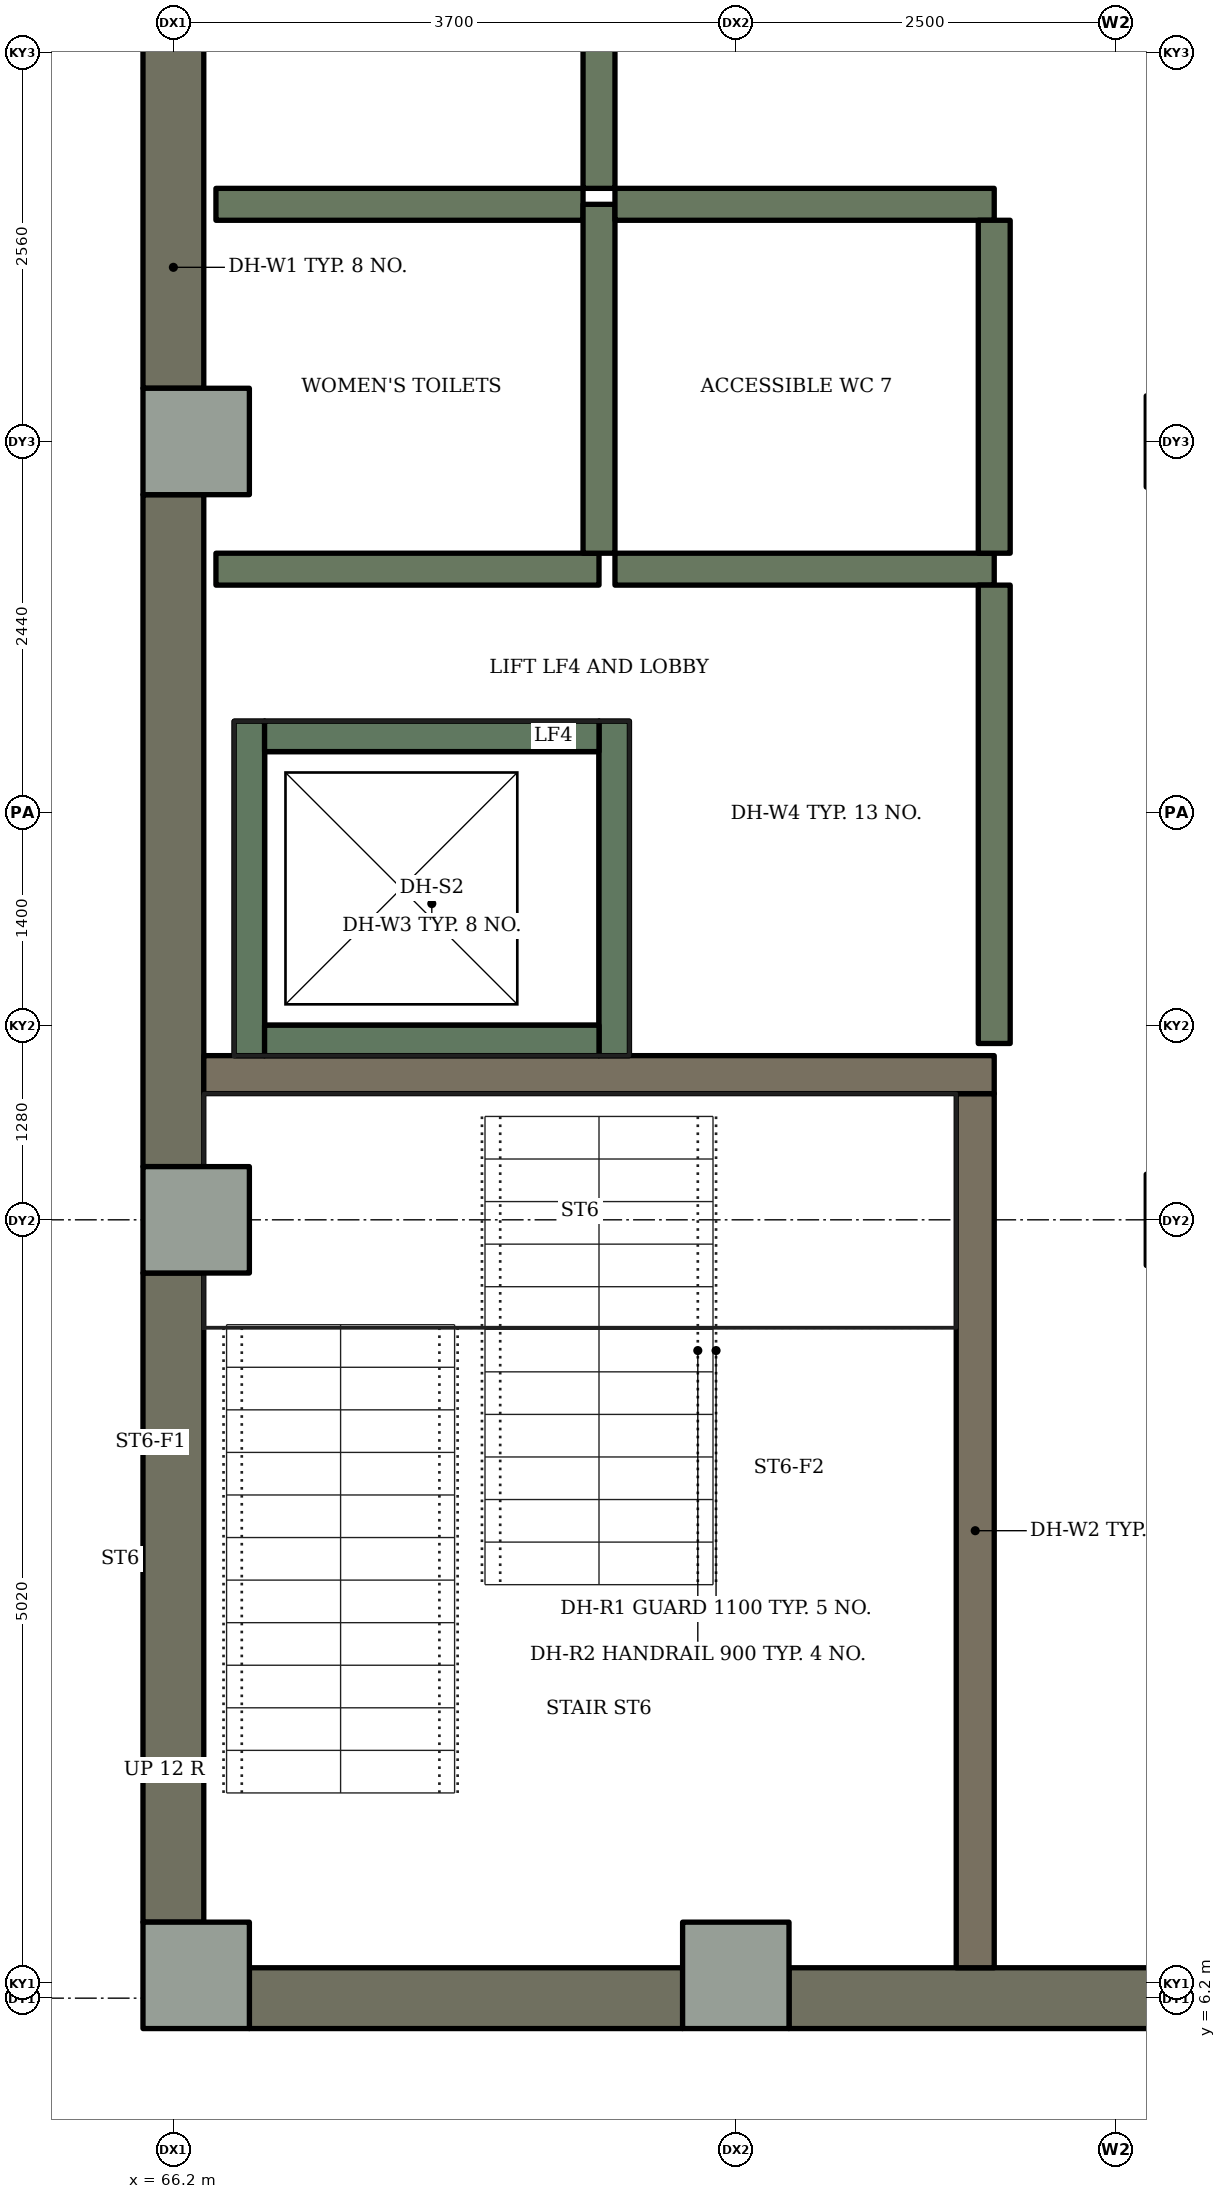
"""IFC4 building model, lengths in metres.
Left out: names, types, materials, properties, quantities, classifications, styles, units other than length and angle.
Written with IfcOpenShell. Run it as: python <this file> out.ifc"""

import sys

from ifc_helpers import new_model, si_unit, direction, frame, frame_2d, origin, origin_2d, place, context, subcontext, project, spatial, rectangle, extrude, element, fill, save


model = new_model("IFC4")
c1 = context("Model", 3, precision=1e-05, world=origin(), true_north=direction((0.0, 1.0)))
c2 = subcontext(c1, "Body", "Model", "MODEL_VIEW")
j1 = project(units=[si_unit("LENGTHUNIT", "METRE"), si_unit("PLANEANGLEUNIT", "RADIAN")], contexts=[c1])
p1 = place(None, origin())
s1 = spatial("IfcSite", under=j1, at=p1, CompositionType="ELEMENT")
p2 = place(p1, origin())
s2 = spatial("IfcBuilding", under=s1, at=p2, CompositionType="ELEMENT")
p3 = place(p2, origin())
s3 = spatial("IfcBuildingStorey", under=s2, at=p3, CompositionType="ELEMENT", Elevation=0.0)
for number, where, z_axis, x_axis in (
    (1, (66.35, 6.35, 0.0), (0.0, 0.0, 1.0), (1.0, 0.0, 0.0)),
    (2, (69.9, 6.35, 0.0), (0.0, 0.0, 1.0), (1.0, 0.0, 0.0)),
    (3, (66.35, 11.32, 0.0), (0.0, 0.0, 1.0), (1.0, 0.0, 0.0)),
    (4, (66.35, 16.44, 0.0), (0.0, 0.0, 1.0), (1.0, 0.0, 0.0)),
):
    element("IfcColumn", number, at=place(p3, frame(where, z_axis=z_axis, x_axis=x_axis)), inside=s3, PredefinedType="COLUMN", context=c2, shape_type="SweptSolid", body=[
        extrude(rectangle(XDim=0.7, YDim=0.7, at=origin_2d()), origin(), (0.0, 0.0, 1.0), 4.2),
    ])
p4 = place(p3, frame((69.55, 6.2, 0.0), z_axis=(0.0, 0.0, 1.0), x_axis=(-1.0, 0.0, 0.0)))
e5 = element("IfcWall", 5, at=p4, inside=s3, PredefinedType="SOLIDWALL", context=c2, shape_type="SweptSolid", body=[
    extrude(rectangle(XDim=2.85, YDim=0.4, at=frame_2d((1.425, 0.0))), origin(), (0.0, 0.0, 1.0), 4.2),
])
p5 = place(p4, frame((1.55, 0.0, 0.0)))
e6 = element("IfcOpeningElement", 6, at=p5, cuts=e5, PredefinedType="OPENING", context=c2, shape_type="SweptSolid", body=[
    extrude(rectangle(XDim=1.0, YDim=2.4, at=frame_2d((0.5, 1.2))), frame((0.0, 0.21, 0.0), z_axis=(0.0, -1.0, 0.0), x_axis=(1.0, 0.0, 0.0)), (0.0, 0.0, 1.0), 0.42),
])
p6 = place(p3, frame((73.25, 6.2, 0.0), z_axis=(0.0, 0.0, 1.0), x_axis=(-1.0, 0.0, 0.0)))
e7 = element("IfcWall", 7, at=p6, inside=s3, PredefinedType="SOLIDWALL", context=c2, shape_type="SweptSolid", body=[
    extrude(rectangle(XDim=3.0, YDim=0.4, at=frame_2d((1.5, 0.0))), origin(), (0.0, 0.0, 1.0), 4.2),
])
p7 = place(p3, frame((66.2, 6.7, 0.0), z_axis=(0.0, 0.0, 1.0), x_axis=(0.0, 1.0, 0.0)))
e8 = element("IfcWall", 8, at=p7, inside=s3, PredefinedType="SOLIDWALL", context=c2, shape_type="SweptSolid", body=[
    extrude(rectangle(XDim=4.27, YDim=0.4, at=frame_2d((2.135, 0.0))), origin(), (0.0, 0.0, 1.0), 4.2),
])
p8 = place(p7, frame((1.685, 0.0, 0.9)))
e9 = element("IfcOpeningElement", 9, at=p8, cuts=e8, PredefinedType="OPENING", context=c2, shape_type="SweptSolid", body=[
    extrude(rectangle(XDim=0.9, YDim=1.8, at=frame_2d((0.45, 0.9))), frame((0.0, 0.21, 0.0), z_axis=(0.0, -1.0, 0.0), x_axis=(1.0, 0.0, 0.0)), (0.0, 0.0, 1.0), 0.42),
])
p9 = place(p3, frame((66.2, 11.67, 0.0), z_axis=(0.0, 0.0, 1.0), x_axis=(0.0, 1.0, 0.0)))
e10 = element("IfcWall", 10, at=p9, inside=s3, PredefinedType="SOLIDWALL", context=c2, shape_type="SweptSolid", body=[
    extrude(rectangle(XDim=4.42, YDim=0.4, at=frame_2d((2.21, 0.0))), origin(), (0.0, 0.0, 1.0), 4.2),
])
p10 = place(p9, frame((0.73, 0.0, 1.5)))
e11 = element("IfcOpeningElement", 11, at=p10, cuts=e10, PredefinedType="OPENING", context=c2, shape_type="SweptSolid", body=[
    extrude(rectangle(XDim=0.6, YDim=1.2, at=frame_2d((0.3, 0.6))), frame((0.0, 0.21, 0.0), z_axis=(0.0, -1.0, 0.0), x_axis=(1.0, 0.0, 0.0)), (0.0, 0.0, 1.0), 0.42),
])
p11 = place(p9, frame((3.43, 0.0, 1.5)))
e12 = element("IfcOpeningElement", 12, at=p11, cuts=e10, PredefinedType="OPENING", context=c2, shape_type="SweptSolid", body=[
    extrude(rectangle(XDim=0.6, YDim=1.2, at=frame_2d((0.3, 0.6))), frame((0.0, 0.21, 0.0), z_axis=(0.0, -1.0, 0.0), x_axis=(1.0, 0.0, 0.0)), (0.0, 0.0, 1.0), 0.42),
])
p12 = place(p3, frame((66.2, 16.79, 0.0), z_axis=(0.0, 0.0, 1.0), x_axis=(0.0, 1.0, 0.0)))
e13 = element("IfcWall", 13, at=p12, inside=s3, PredefinedType="SOLIDWALL", context=c2, shape_type="SweptSolid", body=[
    extrude(rectangle(XDim=4.42, YDim=0.4, at=frame_2d((2.21, 0.0))), origin(), (0.0, 0.0, 1.0), 4.2),
])
p13 = place(p12, frame((1.71, 0.0, 0.9)))
e14 = element("IfcOpeningElement", 14, at=p13, cuts=e13, PredefinedType="OPENING", context=c2, shape_type="SweptSolid", body=[
    extrude(rectangle(XDim=1.0, YDim=2.4, at=frame_2d((0.5, 1.2))), frame((0.0, 0.21, 0.0), z_axis=(0.0, -1.0, 0.0), x_axis=(1.0, 0.0, 0.0)), (0.0, 0.0, 1.0), 0.42),
])
p14 = place(p3, frame((71.475, 6.4, 0.0), z_axis=(0.0, 0.0, 1.0), x_axis=(0.0, 1.0, 0.0)))
e15 = element("IfcWall", 15, at=p14, inside=s3, PredefinedType="SHEAR", context=c2, shape_type="SweptSolid", body=[
    extrude(rectangle(XDim=5.75, YDim=0.25, at=frame_2d((2.875, 0.0))), origin(), (0.0, 0.0, 1.0), 4.2),
])
p15 = place(p14, frame((0.85, 0.0, 0.0)))
e16 = element("IfcOpeningElement", 16, at=p15, cuts=e15, PredefinedType="OPENING", context=c2, shape_type="SweptSolid", body=[
    extrude(rectangle(XDim=1.0, YDim=2.1, at=frame_2d((0.5, 1.05))), frame((0.0, 0.135, 0.0), z_axis=(0.0, -1.0, 0.0), x_axis=(1.0, 0.0, 0.0)), (0.0, 0.0, 1.0), 0.27),
])
p16 = place(p3, frame((66.4, 12.275, 0.0), z_axis=(0.0, 0.0, 1.0), x_axis=(1.0, 0.0, 0.0)))
e17 = element("IfcWall", 17, at=p16, inside=s3, PredefinedType="SHEAR", context=c2, shape_type="SweptSolid", body=[
    extrude(rectangle(XDim=5.2, YDim=0.25, at=frame_2d((2.6, 0.0))), origin(), (0.0, 0.0, 1.0), 4.2),
])
p17 = place(p3, frame((66.7, 12.4, 0.0), z_axis=(0.0, 0.0, 1.0), x_axis=(0.0, 1.0, 0.0)))
e18 = element("IfcWall", 18, at=p17, inside=s3, PredefinedType="SHEAR", context=c2, shape_type="SweptSolid", body=[
    extrude(rectangle(XDim=2.2, YDim=0.2, at=frame_2d((1.1, 0.0))), origin(), (0.0, 0.0, 1.0), 4.2),
])
p18 = place(p3, frame((69.1, 12.4, 0.0), z_axis=(0.0, 0.0, 1.0), x_axis=(0.0, 1.0, 0.0)))
e19 = element("IfcWall", 19, at=p18, inside=s3, PredefinedType="SHEAR", context=c2, shape_type="SweptSolid", body=[
    extrude(rectangle(XDim=2.2, YDim=0.2, at=frame_2d((1.1, 0.0))), origin(), (0.0, 0.0, 1.0), 4.2),
])
p19 = place(p18, frame((0.55, 0.0, 0.0)))
e20 = element("IfcOpeningElement", 20, at=p19, cuts=e19, PredefinedType="OPENING", context=c2, shape_type="SweptSolid", body=[
    extrude(rectangle(XDim=1.1, YDim=2.1, at=frame_2d((0.55, 1.05))), frame((0.0, 0.11, 0.0), z_axis=(0.0, -1.0, 0.0), x_axis=(1.0, 0.0, 0.0)), (0.0, 0.0, 1.0), 0.22),
])
for number, where, z_axis, x_axis in (
    (21, (66.8, 12.5, 0.0), (0.0, 0.0, 1.0), (1.0, 0.0, 0.0)),
    (22, (66.8, 14.5, 0.0), (0.0, 0.0, 1.0), (1.0, 0.0, 0.0)),
):
    element("IfcWall", number, at=place(p3, frame(where, z_axis=z_axis, x_axis=x_axis)), inside=s3, PredefinedType="SHEAR", context=c2, shape_type="SweptSolid", body=[
        extrude(rectangle(XDim=2.2, YDim=0.2, at=frame_2d((1.1, 0.0))), origin(), (0.0, 0.0, 1.0), 4.2),
    ])
for number, where, z_axis, x_axis in (
    (23, (66.7, 12.4, -1.4), (0.0, 0.0, 1.0), (0.0, 1.0, 0.0)),
    (24, (69.1, 12.4, -1.4), (0.0, 0.0, 1.0), (0.0, 1.0, 0.0)),
):
    element("IfcWall", number, at=place(p3, frame(where, z_axis=z_axis, x_axis=x_axis)), inside=s3, PredefinedType="SHEAR", context=c2, shape_type="SweptSolid", body=[
        extrude(rectangle(XDim=2.2, YDim=0.2, at=frame_2d((1.1, 0.0))), origin(), (0.0, 0.0, 1.0), 1.4),
    ])
for number, where, z_axis, x_axis in (
    (25, (66.8, 12.5, -1.4), (0.0, 0.0, 1.0), (1.0, 0.0, 0.0)),
    (26, (66.8, 14.5, -1.4), (0.0, 0.0, 1.0), (1.0, 0.0, 0.0)),
):
    element("IfcWall", number, at=place(p3, frame(where, z_axis=z_axis, x_axis=x_axis)), inside=s3, PredefinedType="SHEAR", context=c2, shape_type="SweptSolid", body=[
        extrude(rectangle(XDim=2.2, YDim=0.2, at=frame_2d((1.1, 0.0))), origin(), (0.0, 0.0, 1.0), 1.4),
    ])
for number, where, z_axis, x_axis in (
    (27, (72.9, 11.32, 0.0), (0.0, 0.0, 1.0), (1.0, 0.0, 0.0)),
    (28, (72.9, 16.44, 0.0), (0.0, 0.0, 1.0), (1.0, 0.0, 0.0)),
):
    element("IfcColumn", number, at=place(p3, frame(where, z_axis=z_axis, x_axis=x_axis)), inside=s3, PredefinedType="COLUMN", context=c2, shape_type="SweptSolid", body=[
        extrude(rectangle(XDim=0.6, YDim=0.6, at=origin_2d()), origin(), (0.0, 0.0, 1.0), 4.2),
    ])
for number, where, z_axis, x_axis in (
    (29, (66.4, 11.59, 0.0), (0.0, 0.0, 1.0), (0.0, -1.0, 0.0)),
    (30, (66.4, 16.71, 0.0), (0.0, 0.0, 1.0), (0.0, -1.0, 0.0)),
):
    element("IfcWall", number, at=place(p3, frame(where, z_axis=z_axis, x_axis=x_axis)), inside=s3, PredefinedType="PARTITIONING", context=c2, shape_type="SweptSolid", body=[
        extrude(rectangle(XDim=0.54, YDim=0.21, at=frame_2d((0.27, 0.0))), origin(), (0.0, 0.0, 1.0), 3.98),
    ])
p20 = place(p3, frame((66.48, 15.6, 0.0), z_axis=(0.0, 0.0, 1.0), x_axis=(1.0, 0.0, 0.0)))
e31 = element("IfcWall", 31, at=p20, inside=s3, PredefinedType="PARTITIONING", context=c2, shape_type="SweptSolid", body=[
    extrude(rectangle(XDim=2.52, YDim=0.21, at=frame_2d((1.26, 0.0))), origin(), (0.0, 0.0, 1.0), 3.98),
])
p21 = place(p20, frame((0.77, 0.0, 0.0)))
e32 = element("IfcOpeningElement", 32, at=p21, cuts=e31, PredefinedType="OPENING", context=c2, shape_type="SweptSolid", body=[
    extrude(rectangle(XDim=1.0, YDim=2.1, at=frame_2d((0.5, 1.05))), frame((0.0, 0.115, 0.0), z_axis=(0.0, -1.0, 0.0), x_axis=(1.0, 0.0, 0.0)), (0.0, 0.0, 1.0), 0.23),
])
p22 = place(p3, frame((68.895, 18.0, 0.0), z_axis=(0.0, 0.0, 1.0), x_axis=(-1.0, 0.0, 0.0)))
e33 = element("IfcWall", 33, at=p22, inside=s3, PredefinedType="PARTITIONING", context=c2, shape_type="SweptSolid", body=[
    extrude(rectangle(XDim=2.415, YDim=0.21, at=frame_2d((1.208, 0.0))), origin(), (0.0, 0.0, 1.0), 3.98),
])
for number, where, z_axis, x_axis in (
    (34, (69.0, 15.705, 0.0), (0.0, 0.0, 1.0), (0.0, 1.0, 0.0)),
    (35, (69.0, 18.105, 0.0), (0.0, 0.0, 1.0), (0.0, 1.0, 0.0)),
):
    element("IfcWall", number, at=place(p3, frame(where, z_axis=z_axis, x_axis=x_axis)), inside=s3, PredefinedType="PARTITIONING", context=c2, shape_type="SweptSolid", body=[
        extrude(rectangle(XDim=2.295, YDim=0.21, at=frame_2d((1.147, 0.0))), origin(), (0.0, 0.0, 1.0), 3.98),
    ])
p23 = place(p3, frame((69.105, 15.6, 0.0), z_axis=(0.0, 0.0, 1.0), x_axis=(1.0, 0.0, 0.0)))
e36 = element("IfcWall", 36, at=p23, inside=s3, PredefinedType="PARTITIONING", context=c2, shape_type="SweptSolid", body=[
    extrude(rectangle(XDim=2.495, YDim=0.21, at=frame_2d((1.248, 0.0))), origin(), (0.0, 0.0, 1.0), 3.98),
])
p24 = place(p23, frame((0.645, 0.0, 0.0)))
e37 = element("IfcOpeningElement", 37, at=p24, cuts=e36, PredefinedType="OPENING", context=c2, shape_type="SweptSolid", body=[
    extrude(rectangle(XDim=1.0, YDim=2.1, at=frame_2d((0.5, 1.05))), frame((0.0, 0.115, 0.0), z_axis=(0.0, -1.0, 0.0), x_axis=(1.0, 0.0, 0.0)), (0.0, 0.0, 1.0), 0.23),
])
p25 = place(p3, frame((69.105, 18.0, 0.0), z_axis=(0.0, 0.0, 1.0), x_axis=(1.0, 0.0, 0.0)))
e38 = element("IfcWall", 38, at=p25, inside=s3, PredefinedType="PARTITIONING", context=c2, shape_type="SweptSolid", body=[
    extrude(rectangle(XDim=2.495, YDim=0.21, at=frame_2d((1.248, 0.0))), origin(), (0.0, 0.0, 1.0), 3.98),
])
p26 = place(p3, frame((69.63, 6.4, 0.0), z_axis=(0.0, 0.0, 1.0), x_axis=(1.0, 0.0, 0.0)))
e39 = element("IfcWall", 39, at=p26, inside=s3, PredefinedType="PARTITIONING", context=c2, shape_type="SweptSolid", body=[
    extrude(rectangle(XDim=0.54, YDim=0.21, at=frame_2d((0.27, 0.0))), origin(), (0.0, 0.0, 1.0), 3.98),
])
p27 = place(p3, frame((71.6, 12.48, 0.0), z_axis=(0.0, 0.0, 1.0), x_axis=(0.0, 1.0, 0.0)))
e40 = element("IfcWall", 40, at=p27, inside=s3, PredefinedType="PARTITIONING", context=c2, shape_type="SweptSolid", body=[
    extrude(rectangle(XDim=3.015, YDim=0.21, at=frame_2d((1.508, 0.0))), origin(), (0.0, 0.0, 1.0), 3.98),
])
p28 = place(p27, frame((1.07, 0.0, 0.0)))
e41 = element("IfcOpeningElement", 41, at=p28, cuts=e40, PredefinedType="OPENING", context=c2, shape_type="SweptSolid", body=[
    extrude(rectangle(XDim=1.0, YDim=2.1, at=frame_2d((0.5, 1.05))), frame((0.0, 0.115, 0.0), z_axis=(0.0, -1.0, 0.0), x_axis=(1.0, 0.0, 0.0)), (0.0, 0.0, 1.0), 0.23),
])
p29 = place(p3, frame((71.6, 15.705, 0.0), z_axis=(0.0, 0.0, 1.0), x_axis=(0.0, 1.0, 0.0)))
e42 = element("IfcWall", 42, at=p29, inside=s3, PredefinedType="PARTITIONING", context=c2, shape_type="SweptSolid", body=[
    extrude(rectangle(XDim=2.19, YDim=0.21, at=frame_2d((1.095, 0.0))), origin(), (0.0, 0.0, 1.0), 3.98),
])
p30 = place(p5, origin())
e43 = element("IfcDoor", 43, at=p30, inside=s3, OperationType="SINGLE_SWING_LEFT", PredefinedType="DOOR", context=c2, shape_type="SweptSolid", body=[
    extrude(rectangle(XDim=1.0, YDim=2.4, at=frame_2d((0.5, 1.2))), frame((0.0, 0.025, 0.0), z_axis=(0.0, -1.0, 0.0), x_axis=(1.0, 0.0, 0.0)), (0.0, 0.0, 1.0), 0.05),
])
fill(e6, e43)
p31 = place(p8, origin())
e44 = element("IfcWindow", 44, at=p31, inside=s3, PartitioningType="SINGLE_PANEL", PredefinedType="WINDOW", context=c2, shape_type="SweptSolid", body=[
    extrude(rectangle(XDim=0.9, YDim=1.8, at=frame_2d((0.45, 0.9))), frame((0.0, 0.03, 0.0), z_axis=(0.0, -1.0, 0.0), x_axis=(1.0, 0.0, 0.0)), (0.0, 0.0, 1.0), 0.06),
])
fill(e9, e44)
p32 = place(p10, origin())
e45 = element("IfcWindow", 45, at=p32, inside=s3, PartitioningType="SINGLE_PANEL", PredefinedType="WINDOW", context=c2, shape_type="SweptSolid", body=[
    extrude(rectangle(XDim=0.6, YDim=1.2, at=frame_2d((0.3, 0.6))), frame((0.0, 0.03, 0.0), z_axis=(0.0, -1.0, 0.0), x_axis=(1.0, 0.0, 0.0)), (0.0, 0.0, 1.0), 0.06),
])
fill(e11, e45)
p33 = place(p11, origin())
e46 = element("IfcWindow", 46, at=p33, inside=s3, PartitioningType="SINGLE_PANEL", PredefinedType="WINDOW", context=c2, shape_type="SweptSolid", body=[
    extrude(rectangle(XDim=0.6, YDim=1.2, at=frame_2d((0.3, 0.6))), frame((0.0, 0.03, 0.0), z_axis=(0.0, -1.0, 0.0), x_axis=(1.0, 0.0, 0.0)), (0.0, 0.0, 1.0), 0.06),
])
fill(e12, e46)
p34 = place(p13, origin())
e47 = element("IfcWindow", 47, at=p34, inside=s3, PartitioningType="SINGLE_PANEL", PredefinedType="WINDOW", context=c2, shape_type="SweptSolid", body=[
    extrude(rectangle(XDim=1.0, YDim=2.4, at=frame_2d((0.5, 1.2))), frame((0.0, 0.03, 0.0), z_axis=(0.0, -1.0, 0.0), x_axis=(1.0, 0.0, 0.0)), (0.0, 0.0, 1.0), 0.06),
])
fill(e14, e47)
p35 = place(p19, origin())
e48 = element("IfcDoor", 48, at=p35, inside=s3, OperationType="SLIDING_TO_LEFT", PredefinedType="DOOR", context=c2, shape_type="SweptSolid", body=[
    extrude(rectangle(XDim=1.1, YDim=2.1, at=frame_2d((0.55, 1.05))), frame((0.0, 0.025, 0.0), z_axis=(0.0, -1.0, 0.0), x_axis=(1.0, 0.0, 0.0)), (0.0, 0.0, 1.0), 0.05),
])
fill(e20, e48)
p36 = place(p15, origin())
e49 = element("IfcDoor", 49, at=p36, inside=s3, OperationType="SINGLE_SWING_LEFT", PredefinedType="DOOR", context=c2, shape_type="SweptSolid", body=[
    extrude(rectangle(XDim=1.0, YDim=2.1, at=frame_2d((0.5, 1.05))), frame((0.0, 0.025, 0.0), z_axis=(0.0, -1.0, 0.0), x_axis=(1.0, 0.0, 0.0)), (0.0, 0.0, 1.0), 0.05),
])
fill(e16, e49)
p37 = place(p21, origin())
e50 = element("IfcDoor", 50, at=p37, inside=s3, OperationType="SINGLE_SWING_LEFT", PredefinedType="DOOR", context=c2, shape_type="SweptSolid", body=[
    extrude(rectangle(XDim=1.0, YDim=2.1, at=frame_2d((0.5, 1.05))), frame((0.0, 0.025, 0.0), z_axis=(0.0, -1.0, 0.0), x_axis=(1.0, 0.0, 0.0)), (0.0, 0.0, 1.0), 0.05),
])
fill(e32, e50)
p38 = place(p24, origin())
e51 = element("IfcDoor", 51, at=p38, inside=s3, OperationType="SINGLE_SWING_LEFT", PredefinedType="DOOR", context=c2, shape_type="SweptSolid", body=[
    extrude(rectangle(XDim=1.0, YDim=2.1, at=frame_2d((0.5, 1.05))), frame((0.0, 0.025, 0.0), z_axis=(0.0, -1.0, 0.0), x_axis=(1.0, 0.0, 0.0)), (0.0, 0.0, 1.0), 0.05),
])
fill(e37, e51)
p39 = place(p28, origin())
e52 = element("IfcDoor", 52, at=p39, inside=s3, OperationType="SINGLE_SWING_LEFT", PredefinedType="DOOR", context=c2, shape_type="SweptSolid", body=[
    extrude(rectangle(XDim=1.0, YDim=2.1, at=frame_2d((0.5, 1.05))), frame((0.0, 0.025, 0.0), z_axis=(0.0, -1.0, 0.0), x_axis=(1.0, 0.0, 0.0)), (0.0, 0.0, 1.0), 0.05),
])
fill(e41, e52)
save(model, sys.argv[1])
